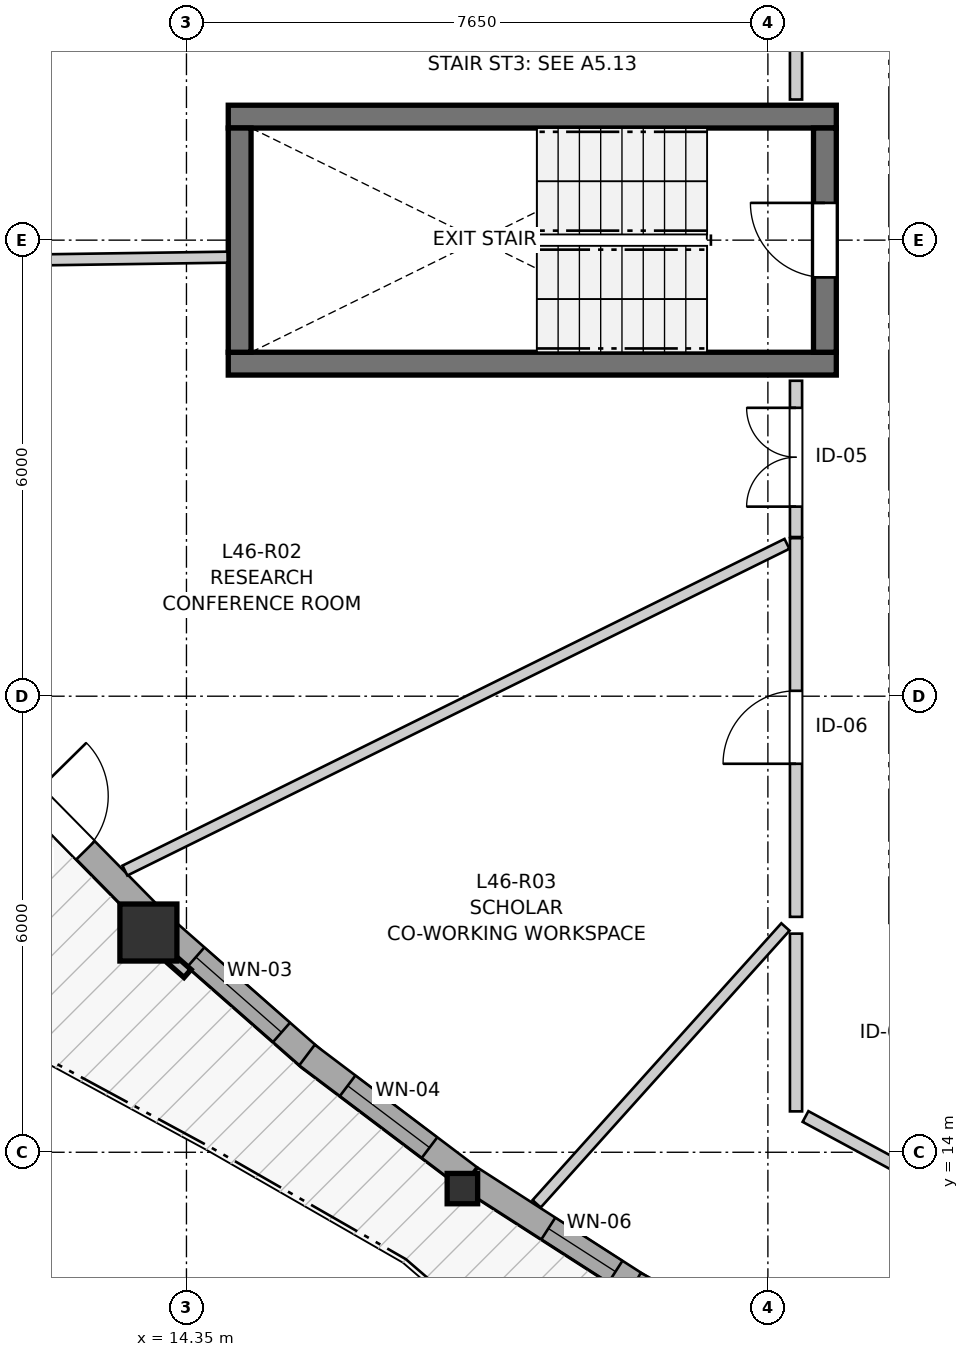
"""IFC4 building model, lengths in metres.
Left out: names, types, materials, properties, quantities, classifications, styles, units other than length and angle.
Written with IfcOpenShell. Run it as: python <this file> out.ifc"""

import sys

from ifc_helpers import new_model, si_unit, direction, frame, frame_2d, origin, origin_2d, place, context, subcontext, project, spatial, rectangle, i_section, extrude, source, transform, mapped, element, fill, save


model = new_model("IFC4")
c1 = context("Model", 3, precision=1e-05, world=origin(), true_north=direction((0.0, 1.0)))
c2 = subcontext(c1, "Body", "Model", "MODEL_VIEW")
j1 = project(units=[si_unit("LENGTHUNIT", "METRE"), si_unit("PLANEANGLEUNIT", "RADIAN")], contexts=[c1])
p1 = place(None, origin())
s1 = spatial("IfcSite", under=j1, at=p1, CompositionType="ELEMENT")
p2 = place(p1, origin())
s2 = spatial("IfcBuilding", under=s1, at=p2, CompositionType="ELEMENT")
p3 = place(p2, frame((0.0, 0.0, 155.4)))
s3 = spatial("IfcBuildingStorey", under=s2, at=p3, CompositionType="ELEMENT", Elevation=155.4)
for number, where, z_axis, x_axis in (
    (1, (14.9, 24.375, 0.0), (0.0, 0.0, 1.0), (1.0, 0.0, 0.0)),
    (2, (22.9, 27.625, 0.0), (0.0, 0.0, 1.0), (-1.0, 0.0, 0.0)),
):
    element("IfcWall", number, at=place(p3, frame(where, z_axis=z_axis, x_axis=x_axis)), inside=s3, PredefinedType="SHEAR", context=c2, shape_type="SweptSolid", body=[
        extrude(rectangle(XDim=8.0, YDim=0.3, at=frame_2d((4.0, 0.0))), origin(), (0.0, 0.0, 1.0), 2.935),
    ])
p4 = place(p3, frame((15.05, 27.475, 0.0), z_axis=(0.0, 0.0, 1.0), x_axis=(0.0, -1.0, 0.0)))
e3 = element("IfcWall", 3, at=p4, inside=s3, PredefinedType="SHEAR", context=c2, shape_type="SweptSolid", body=[
    extrude(rectangle(XDim=2.95, YDim=0.3, at=frame_2d((1.475, 0.0))), origin(), (0.0, 0.0, 1.0), 2.935),
])
p5 = place(p3, frame((22.75, 24.525, 0.0), z_axis=(0.0, 0.0, 1.0), x_axis=(0.0, 1.0, 0.0)))
e4 = element("IfcWall", 4, at=p5, inside=s3, PredefinedType="SHEAR", context=c2, shape_type="SweptSolid", body=[
    extrude(rectangle(XDim=2.95, YDim=0.3, at=frame_2d((1.475, 0.0))), origin(), (0.0, 0.0, 1.0), 2.935),
])
p6 = place(p5, frame((0.985, 0.0, 0.0)))
e5 = element("IfcOpeningElement", 5, at=p6, cuts=e4, PredefinedType="OPENING", context=c2, shape_type="SweptSolid", body=[
    extrude(rectangle(XDim=0.98, YDim=2.15, at=frame_2d((0.49, 1.075))), frame((0.0, 0.16, 0.0), z_axis=(0.0, -1.0, 0.0), x_axis=(1.0, 0.0, 0.0)), (0.0, 0.0, 1.0), 0.32),
])
m1 = source(origin(), c2, "Body", "SweptSolid", [
    extrude(rectangle(XDim=0.75, YDim=0.75, at=origin_2d()), origin(), (0.0, 0.0, 1.0), 2.935),
])
p7 = place(p3, frame((13.849, 16.891, 0.0), z_axis=(0.0, 0.0, 1.0), x_axis=(1.0, 0.0, 0.0)))
e6 = element("IfcColumn", 6, at=p7, inside=s3, PredefinedType="COLUMN", context=c2, shape_type="MappedRepresentation", body=[
    mapped(m1, transform((0.0, 0.0, 0.0), x_axis=(1.0, 0.0, 0.0), y_axis=(0.0, 1.0, 0.0), z_axis=(0.0, 0.0, 1.0), scale=1.0)),
])
m2 = source(origin(), c2, "Body", "SweptSolid", [
    extrude(i_section(OverallWidth=0.401, OverallDepth=0.399, WebThickness=0.023, FlangeThickness=0.036, FilletRadius=0.015, at=origin_2d()), origin(), (0.0, 0.0, 1.0), 2.935),
])
p8 = place(p3, frame((17.98, 13.522, 0.0), z_axis=(0.0, 0.0, 1.0), x_axis=(1.0, 0.0, 0.0)))
e7 = element("IfcColumn", 7, at=p8, inside=s3, PredefinedType="PILASTER", context=c2, shape_type="MappedRepresentation", body=[
    mapped(m2, transform((0.0, 0.0, 0.0), x_axis=(1.0, 0.0, 0.0), y_axis=(0.0, 1.0, 0.0), z_axis=(0.0, 0.0, 1.0), scale=1.0)),
])
p9 = place(p3, frame((12.031, 18.98, 0.0), z_axis=(0.0, 0.0, 1.0), x_axis=(0.701518749222, -0.712650997677, 0.0)))
e8 = element("IfcWall", 8, at=p9, inside=s3, PredefinedType="SOLIDWALL", context=c2, shape_type="SweptSolid", body=[
    extrude(rectangle(XDim=2.61, YDim=0.34, at=frame_2d((1.305, 0.0))), origin(), (0.0, 0.0, 1.0), 2.515),
])
p10 = place(p9, frame((0.413, 0.0, 0.0)))
e9 = element("IfcOpeningElement", 9, at=p10, cuts=e8, PredefinedType="OPENING", context=c2, shape_type="SweptSolid", body=[
    extrude(rectangle(XDim=1.0, YDim=2.1, at=frame_2d((0.5, 1.05))), frame((0.0, 0.18, 0.0), z_axis=(0.0, -1.0, 0.0), x_axis=(1.0, 0.0, 0.0)), (0.0, 0.0, 1.0), 0.36),
])
p11 = place(p3, frame((14.078, 16.916, 0.0), z_axis=(0.0, 0.0, 1.0), x_axis=(0.751177768463, -0.660099962253, 0.0)))
e10 = element("IfcWall", 10, at=p11, inside=s3, PredefinedType="SOLIDWALL", context=c2, shape_type="SweptSolid", body=[
    extrude(rectangle(XDim=2.565, YDim=0.34, at=frame_2d((1.283, 0.0))), origin(), (0.0, 0.0, 1.0), 2.515),
])
p12 = place(p11, frame((0.528, 0.0, 0.82)))
e11 = element("IfcOpeningElement", 11, at=p12, cuts=e10, PredefinedType="OPENING", context=c2, shape_type="SweptSolid", body=[
    extrude(rectangle(XDim=1.5, YDim=1.45, at=frame_2d((0.75, 0.725))), frame((0.0, 0.18, 0.0), z_axis=(0.0, -1.0, 0.0), x_axis=(1.0, 0.0, 0.0)), (0.0, 0.0, 1.0), 0.36),
])
p13 = place(p3, frame((15.936, 15.279, 0.0), z_axis=(0.0, 0.0, 1.0), x_axis=(0.798020729511, -0.602629998649, 0.0)))
e12 = element("IfcWall", 12, at=p13, inside=s3, PredefinedType="SOLIDWALL", context=c2, shape_type="SweptSolid", body=[
    extrude(rectangle(XDim=2.67, YDim=0.34, at=frame_2d((1.335, 0.0))), origin(), (0.0, 0.0, 1.0), 2.515),
])
p14 = place(p13, frame((0.67, 0.0, 0.82)))
e13 = element("IfcOpeningElement", 13, at=p14, cuts=e12, PredefinedType="OPENING", context=c2, shape_type="SweptSolid", body=[
    extrude(rectangle(XDim=1.35, YDim=1.45, at=frame_2d((0.675, 0.725))), frame((0.0, 0.18, 0.0), z_axis=(0.0, -1.0, 0.0), x_axis=(1.0, 0.0, 0.0)), (0.0, 0.0, 1.0), 0.36),
])
p15 = place(p3, frame((18.089, 13.654, 0.0), z_axis=(0.0, 0.0, 1.0), x_axis=(0.841241207466, -0.540659995617, 0.0)))
e14 = element("IfcWall", 14, at=p15, inside=s3, PredefinedType="SOLIDWALL", context=c2, shape_type="SweptSolid", body=[
    extrude(rectangle(XDim=2.655, YDim=0.34, at=frame_2d((1.328, 0.0))), origin(), (0.0, 0.0, 1.0), 2.515),
])
p16 = place(p15, frame((1.215, 0.0, 0.82)))
e15 = element("IfcOpeningElement", 15, at=p16, cuts=e14, PredefinedType="OPENING", context=c2, shape_type="SweptSolid", body=[
    extrude(rectangle(XDim=1.05, YDim=1.45, at=frame_2d((0.525, 0.725))), frame((0.0, 0.18, 0.0), z_axis=(0.0, -1.0, 0.0), x_axis=(1.0, 0.0, 0.0)), (0.0, 0.0, 1.0), 0.36),
])
p17 = place(p3, frame((20.246, 12.264, 0.0), z_axis=(0.0, 0.0, 1.0), x_axis=(0.879813837033, -0.475318432385, 0.0)))
e16 = element("IfcWall", 16, at=p17, inside=s3, PredefinedType="SOLIDWALL", context=c2, shape_type="SweptSolid", body=[
    extrude(rectangle(XDim=2.52, YDim=0.34, at=frame_2d((1.26, 0.0))), origin(), (0.0, 0.0, 1.0), 2.515),
])
p18 = place(p17, frame((0.74, 0.0, 0.82)))
e17 = element("IfcOpeningElement", 17, at=p18, cuts=e16, PredefinedType="OPENING", context=c2, shape_type="SweptSolid", body=[
    extrude(rectangle(XDim=1.05, YDim=1.45, at=frame_2d((0.525, 0.725))), frame((0.0, 0.18, 0.0), z_axis=(0.0, -1.0, 0.0), x_axis=(1.0, 0.0, 0.0)), (0.0, 0.0, 1.0), 0.36),
])
p19 = place(p3, frame((22.37, 27.85, 0.0), z_axis=(0.0, 0.0, 1.0), x_axis=(0.0, 1.0, 0.0)))
e18 = element("IfcWall", 18, at=p19, inside=s3, PredefinedType="PARTITIONING", context=c2, shape_type="SweptSolid", body=[
    extrude(rectangle(XDim=5.294, YDim=0.16, at=frame_2d((2.647, 0.0))), origin(), (0.0, 0.0, 1.0), 2.935),
])
p20 = place(p19, frame((2.341, 0.0, 0.0)))
e19 = element("IfcOpeningElement", 19, at=p20, cuts=e18, PredefinedType="OPENING", context=c2, shape_type="SweptSolid", body=[
    extrude(rectangle(XDim=1.3, YDim=2.1, at=frame_2d((0.65, 1.05))), frame((0.0, 0.09, 0.0), z_axis=(0.0, -1.0, 0.0), x_axis=(1.0, 0.0, 0.0)), (0.0, 0.0, 1.0), 0.18),
])
p21 = place(p3, frame((22.37, 17.097, 0.0), z_axis=(0.0, 0.0, 1.0), x_axis=(0.0, 1.0, 0.0)))
e20 = element("IfcWall", 20, at=p21, inside=s3, PredefinedType="PARTITIONING", context=c2, shape_type="SweptSolid", body=[
    extrude(rectangle(XDim=4.982, YDim=0.16, at=frame_2d((2.491, 0.0))), origin(), (0.0, 0.0, 1.0), 2.935),
])
p22 = place(p21, frame((2.014, 0.0, 0.0)))
e21 = element("IfcOpeningElement", 21, at=p22, cuts=e20, PredefinedType="OPENING", context=c2, shape_type="SweptSolid", body=[
    extrude(rectangle(XDim=0.96, YDim=2.1, at=frame_2d((0.48, 1.05))), frame((0.0, 0.09, 0.0), z_axis=(0.0, -1.0, 0.0), x_axis=(1.0, 0.0, 0.0)), (0.0, 0.0, 1.0), 0.18),
])
p23 = place(p3, frame((22.37, 22.094, 0.0), z_axis=(0.0, 0.0, 1.0), x_axis=(0.0, 1.0, 0.0)))
e22 = element("IfcWall", 22, at=p23, inside=s3, PredefinedType="PARTITIONING", context=c2, shape_type="SweptSolid", body=[
    extrude(rectangle(XDim=2.056, YDim=0.16, at=frame_2d((1.028, 0.0))), origin(), (0.0, 0.0, 1.0), 2.935),
])
p24 = place(p23, frame((0.4, 0.0, 0.0)))
e23 = element("IfcOpeningElement", 23, at=p24, cuts=e22, PredefinedType="OPENING", context=c2, shape_type="SweptSolid", body=[
    extrude(rectangle(XDim=1.3, YDim=2.1, at=frame_2d((0.65, 1.05))), frame((0.0, 0.09, 0.0), z_axis=(0.0, -1.0, 0.0), x_axis=(1.0, 0.0, 0.0)), (0.0, 0.0, 1.0), 0.18),
])
p25 = place(p3, frame((13.54, 17.706, 0.0), z_axis=(0.0, 0.0, 1.0), x_axis=(0.896762400541, 0.442512369291, 0.0)))
e24 = element("IfcWall", 24, at=p25, inside=s3, PredefinedType="PARTITIONING", context=c2, shape_type="SweptSolid", body=[
    extrude(rectangle(XDim=9.713, YDim=0.145, at=frame_2d((4.857, 0.0))), origin(), (0.0, 0.0, 1.0), 2.935),
])
p26 = place(p3, frame((7.689, 25.671, 0.0), z_axis=(0.0, 0.0, 1.0), x_axis=(0.999894747293, 0.014508422953, 0.0)))
e25 = element("IfcWall", 25, at=p26, inside=s3, PredefinedType="PARTITIONING", context=c2, shape_type="SweptSolid", body=[
    extrude(rectangle(XDim=7.202, YDim=0.145, at=frame_2d((3.601, 0.0))), origin(), (0.0, 0.0, 1.0), 2.935),
])
p27 = place(p3, frame((18.957, 13.322, 0.0), z_axis=(0.0, 0.0, 1.0), x_axis=(0.66841369867, 0.743789706456, 0.0)))
e26 = element("IfcWall", 26, at=p27, inside=s3, PredefinedType="PARTITIONING", context=c2, shape_type="SweptSolid", body=[
    extrude(rectangle(XDim=4.897, YDim=0.145, at=frame_2d((2.449, 0.0))), origin(), (0.0, 0.0, 1.0), 2.935),
])
p28 = place(p3, frame((22.37, 14.538, 0.0), z_axis=(0.0, 0.0, 1.0), x_axis=(0.0, 1.0, 0.0)))
e27 = element("IfcWall", 27, at=p28, inside=s3, PredefinedType="PARTITIONING", context=c2, shape_type="SweptSolid", body=[
    extrude(rectangle(XDim=2.338, YDim=0.16, at=frame_2d((1.169, 0.0))), origin(), (0.0, 0.0, 1.0), 2.935),
])
p29 = place(p3, frame((22.495, 14.47, 0.0), z_axis=(0.0, 0.0, 1.0), x_axis=(0.879828765098, -0.475290799517, 0.0)))
e28 = element("IfcWall", 28, at=p29, inside=s3, PredefinedType="PARTITIONING", context=c2, shape_type="SweptSolid", body=[
    extrude(rectangle(XDim=1.625, YDim=0.16, at=frame_2d((0.812, 0.0))), origin(), (0.0, 0.0, 1.0), 2.935),
])
m3 = source(origin(), c2, "Body", "SweptSolid", [
    extrude(rectangle(XDim=1.5, YDim=1.45, at=frame_2d((0.75, 0.725))), frame((0.0, 0.03, 0.0), z_axis=(0.0, -1.0, 0.0), x_axis=(1.0, 0.0, 0.0)), (0.0, 0.0, 1.0), 0.06),
])
p30 = place(p12, origin())
e29 = element("IfcWindow", 29, at=p30, inside=s3, PartitioningType="SINGLE_PANEL", PredefinedType="WINDOW", context=c2, shape_type="MappedRepresentation", body=[
    mapped(m3, transform((0.0, 0.0, 0.0), x_axis=(1.0, 0.0, 0.0), y_axis=(0.0, 1.0, 0.0), z_axis=(0.0, 0.0, 1.0), scale=1.0)),
])
fill(e11, e29)
m4 = source(origin(), c2, "Body", "SweptSolid", [
    extrude(rectangle(XDim=1.35, YDim=1.45, at=frame_2d((0.675, 0.725))), frame((0.0, 0.03, 0.0), z_axis=(0.0, -1.0, 0.0), x_axis=(1.0, 0.0, 0.0)), (0.0, 0.0, 1.0), 0.06),
])
p31 = place(p14, origin())
e30 = element("IfcWindow", 30, at=p31, inside=s3, PartitioningType="SINGLE_PANEL", PredefinedType="WINDOW", context=c2, shape_type="MappedRepresentation", body=[
    mapped(m4, transform((0.0, 0.0, 0.0), x_axis=(1.0, 0.0, 0.0), y_axis=(0.0, 1.0, 0.0), z_axis=(0.0, 0.0, 1.0), scale=1.0)),
])
fill(e13, e30)
m5 = source(origin(), c2, "Body", "SweptSolid", [
    extrude(rectangle(XDim=1.05, YDim=1.45, at=frame_2d((0.525, 0.725))), frame((0.0, 0.03, 0.0), z_axis=(0.0, -1.0, 0.0), x_axis=(1.0, 0.0, 0.0)), (0.0, 0.0, 1.0), 0.06),
])
p32 = place(p16, origin())
e31 = element("IfcWindow", 31, at=p32, inside=s3, PartitioningType="SINGLE_PANEL", PredefinedType="WINDOW", context=c2, shape_type="MappedRepresentation", body=[
    mapped(m5, transform((0.0, 0.0, 0.0), x_axis=(1.0, 0.0, 0.0), y_axis=(0.0, 1.0, 0.0), z_axis=(0.0, 0.0, 1.0), scale=1.0)),
])
fill(e15, e31)
m6 = source(origin(), c2, "Body", "SweptSolid", [
    extrude(rectangle(XDim=1.0, YDim=2.1, at=frame_2d((0.5, 1.05))), frame((0.0, 0.025, 0.0), z_axis=(0.0, -1.0, 0.0), x_axis=(1.0, 0.0, 0.0)), (0.0, 0.0, 1.0), 0.05),
])
p33 = place(p10, origin())
e32 = element("IfcDoor", 32, at=p33, inside=s3, OperationType="SINGLE_SWING_LEFT", PredefinedType="DOOR", context=c2, shape_type="MappedRepresentation", body=[
    mapped(m6, transform((0.0, 0.0, 0.0), x_axis=(1.0, 0.0, 0.0), y_axis=(0.0, 1.0, 0.0), z_axis=(0.0, 0.0, 1.0), scale=1.0)),
])
fill(e9, e32)
m7 = source(origin(), c2, "Body", "SweptSolid", [
    extrude(rectangle(XDim=0.98, YDim=2.15, at=frame_2d((0.49, 1.075))), frame((0.0, 0.025, 0.0), z_axis=(0.0, -1.0, 0.0), x_axis=(1.0, 0.0, 0.0)), (0.0, 0.0, 1.0), 0.05),
])
p34 = place(p6, origin())
e33 = element("IfcDoor", 33, at=p34, inside=s3, OperationType="SINGLE_SWING_RIGHT", PredefinedType="DOOR", context=c2, shape_type="MappedRepresentation", body=[
    mapped(m7, transform((0.0, 0.0, 0.0), x_axis=(1.0, 0.0, 0.0), y_axis=(0.0, 1.0, 0.0), z_axis=(0.0, 0.0, 1.0), scale=1.0)),
])
fill(e5, e33)
m8 = source(origin(), c2, "Body", "SweptSolid", [
    extrude(rectangle(XDim=0.96, YDim=2.1, at=frame_2d((0.48, 1.05))), frame((0.0, 0.025, 0.0), z_axis=(0.0, -1.0, 0.0), x_axis=(1.0, 0.0, 0.0)), (0.0, 0.0, 1.0), 0.05),
])
p35 = place(p22, origin())
e34 = element("IfcDoor", 34, at=p35, inside=s3, OperationType="SINGLE_SWING_LEFT", PredefinedType="DOOR", context=c2, shape_type="MappedRepresentation", body=[
    mapped(m8, transform((0.0, 0.0, 0.0), x_axis=(1.0, 0.0, 0.0), y_axis=(0.0, 1.0, 0.0), z_axis=(0.0, 0.0, 1.0), scale=1.0)),
])
fill(e21, e34)
m9 = source(origin(), c2, "Body", "SweptSolid", [
    extrude(rectangle(XDim=1.3, YDim=2.1, at=frame_2d((0.65, 1.05))), frame((0.0, 0.025, 0.0), z_axis=(0.0, -1.0, 0.0), x_axis=(1.0, 0.0, 0.0)), (0.0, 0.0, 1.0), 0.05),
])
p36 = place(p24, origin())
e35 = element("IfcDoor", 35, at=p36, inside=s3, OperationType="DOUBLE_DOOR_SINGLE_SWING", PredefinedType="DOOR", context=c2, shape_type="MappedRepresentation", body=[
    mapped(m9, transform((0.0, 0.0, 0.0), x_axis=(1.0, 0.0, 0.0), y_axis=(0.0, 1.0, 0.0), z_axis=(0.0, 0.0, 1.0), scale=1.0)),
])
fill(e23, e35)
save(model, sys.argv[1])
